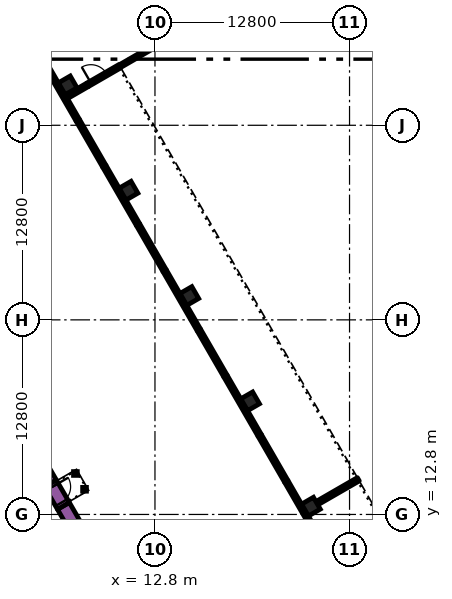
"""IFC4 building model, lengths in metres.
Left out: names, types, materials, properties, quantities, classifications, styles, units other than length and angle.
Written with IfcOpenShell. Run it as: python <this file> out.ifc"""

import sys

from ifc_helpers import new_model, si_unit, direction, frame, frame_2d, origin, origin_2d, place, context, subcontext, project, spatial, rectangle, extrude, element, fill, save


model = new_model("IFC4")
c1 = context("Model", 3, precision=1e-05, world=origin(), true_north=direction((0.0, 1.0)))
c2 = subcontext(c1, "Body", "Model", "MODEL_VIEW")
j1 = project(units=[si_unit("LENGTHUNIT", "METRE"), si_unit("PLANEANGLEUNIT", "RADIAN")], contexts=[c1])
p1 = place(None, origin())
s1 = spatial("IfcSite", under=j1, at=p1, CompositionType="ELEMENT")
p2 = place(p1, origin())
s2 = spatial("IfcBuilding", under=s1, at=p2, CompositionType="ELEMENT")
p3 = place(p2, origin())
s3 = spatial("IfcBuildingStorey", under=s2, at=p3, CompositionType="ELEMENT", Elevation=0.0)
p4 = place(p3, frame((19.355, 12.329, 2.1), z_axis=(-0.200269190983, 0.336813845705, 0.920026458578), x_axis=(-0.859534207637, -0.511078218966, 0.0)))
e1 = element("IfcColumn", 1, at=p4, inside=s3, PredefinedType="COLUMN", context=c2, shape_type="SweptSolid", body=[
    extrude(rectangle(XDim=1.8, YDim=1.6, at=origin_2d()), origin(), (0.0, 0.0, 1.0), 17.608),
])
p5 = place(p2, frame((0.0, 0.0, 11.4)))
s4 = spatial("IfcBuildingStorey", under=s2, at=p5, CompositionType="ELEMENT", Elevation=11.4)
for number, where, z_axis, x_axis in (
    (2, (23.061, 13.314, 0.0), (0.0, 0.0, 1.0), (-0.5, 0.866, 0.0)),
    (3, (19.061, 20.242, 0.0), (0.0, 0.0, 1.0), (-0.5, 0.866, 0.0)),
    (4, (15.061, 27.17, 0.0), (0.0, 0.0, 1.0), (-0.5, 0.866, 0.0)),
    (5, (11.061, 34.099, 0.0), (0.0, 0.0, 1.0), (-0.5, 0.866, 0.0)),
    (6, (7.061, 41.027, 0.0), (0.0, 0.0, 1.0), (-0.5, 0.866, 0.0)),
):
    element("IfcColumn", number, at=place(p5, frame(where, z_axis=z_axis, x_axis=x_axis)), inside=s4, PredefinedType="COLUMN", context=c2, shape_type="SweptSolid", body=[
        extrude(rectangle(XDim=0.9, YDim=0.9, at=origin_2d()), origin(), (0.0, 0.0, 1.0), 4.8),
    ])
p6 = place(p5, frame((6.776, 13.364, 0.0), z_axis=(0.0, 0.0, 1.0), x_axis=(0.500004177138, -0.8660229921, 0.0)))
e7 = element("IfcWall", 7, at=p6, inside=s4, PredefinedType="SOLIDWALL", context=c2, shape_type="SweptSolid", body=[
    extrude(rectangle(XDim=20.204, YDim=0.9, at=frame_2d((10.102, 0.0))), origin(), (0.0, 0.0, 1.0), 4.8),
])
p7 = place(p5, frame((5.926, 14.836, 0.0), z_axis=(0.0, 0.0, 1.0), x_axis=(-0.500076735116, 0.865981096212, 0.0)))
e8 = element("IfcWall", 8, at=p7, inside=s4, PredefinedType="SOLIDWALL", context=c2, shape_type="SweptSolid", body=[
    extrude(rectangle(XDim=1.094, YDim=0.9, at=frame_2d((0.547, 0.0))), origin(), (0.0, 0.0, 1.0), 4.8),
])
p8 = place(p5, frame((5.926, 14.836, 0.0), z_axis=(0.0, 0.0, 1.0), x_axis=(0.500062241894, -0.865989465428, 0.0)))
e9 = element("IfcWall", 9, at=p8, inside=s4, PredefinedType="SOLIDWALL", context=c2, shape_type="SweptSolid", body=[
    extrude(rectangle(XDim=1.7, YDim=0.9, at=frame_2d((0.85, 0.0))), origin(), (0.0, 0.0, 1.0), 4.8),
])
p9 = place(p8, frame((0.25, 0.0, 0.0)))
e10 = element("IfcOpeningElement", 10, at=p9, cuts=e9, PredefinedType="OPENING", context=c2, shape_type="SweptSolid", body=[
    extrude(rectangle(XDim=1.2, YDim=2.1, at=frame_2d((0.6, 1.05))), frame((0.0, 0.46, 0.0), z_axis=(0.0, -1.0, 0.0), x_axis=(1.0, 0.0, 0.0)), (0.0, 0.0, 1.0), 0.92),
])
p10 = place(p2, frame((0.0, 0.0, 6.0)))
s5 = spatial("IfcBuildingStorey", under=s2, at=p10, CompositionType="ELEMENT", Elevation=6.0)
p11 = place(p10, frame((26.178, 15.114, 0.0), z_axis=(0.0, 0.0, 1.0), x_axis=(0.866025540551, 0.499999763114, 0.0)))
e11 = element("IfcWall", 11, at=p11, inside=s5, PredefinedType="SOLIDWALL", context=c2, shape_type="SweptSolid", body=[
    extrude(rectangle(XDim=39.4, YDim=0.25, at=frame_2d((19.7, 0.0))), origin(), (0.0, 0.0, 1.0), 10.2),
])
p12 = place(p5, frame((23.688, 11.078, 0.0), z_axis=(0.0, 0.0, 1.0), x_axis=(-0.499990139034, 0.866031096941, 0.0)))
e12 = element("IfcWall", 12, at=p12, inside=s4, PredefinedType="SOLIDWALL", context=c2, shape_type="SweptSolid", body=[
    extrude(rectangle(XDim=4.5, YDim=0.25, at=frame_2d((2.25, 0.0))), origin(), (0.0, 0.0, 1.0), 4.5),
])
p13 = place(p5, frame((21.438, 14.975, 0.0), z_axis=(0.0, 0.0, 1.0), x_axis=(-0.500010275428, 0.866019471182, 0.0)))
e13 = element("IfcWall", 13, at=p13, inside=s4, PredefinedType="SOLIDWALL", context=c2, shape_type="SweptSolid", body=[
    extrude(rectangle(XDim=3.5, YDim=0.25, at=frame_2d((1.75, 0.0))), origin(), (0.0, 0.0, 1.0), 4.5),
])
p14 = place(p13, frame((0.25, 0.0, 0.9)))
e14 = element("IfcOpeningElement", 14, at=p14, cuts=e13, PredefinedType="OPENING", context=c2, shape_type="SweptSolid", body=[
    extrude(rectangle(XDim=3.0, YDim=2.2, at=frame_2d((1.5, 1.1))), frame((0.0, 0.135, 0.0), z_axis=(0.0, -1.0, 0.0), x_axis=(1.0, 0.0, 0.0)), (0.0, 0.0, 1.0), 0.27),
])
p15 = place(p5, frame((19.688, 18.006, 0.0), z_axis=(0.0, 0.0, 1.0), x_axis=(-0.499990139034, 0.866031096941, 0.0)))
e15 = element("IfcWall", 15, at=p15, inside=s4, PredefinedType="SOLIDWALL", context=c2, shape_type="SweptSolid", body=[
    extrude(rectangle(XDim=4.5, YDim=0.25, at=frame_2d((2.25, 0.0))), origin(), (0.0, 0.0, 1.0), 4.5),
])
p16 = place(p5, frame((17.438, 21.903, 0.0), z_axis=(0.0, 0.0, 1.0), x_axis=(-0.500010275428, 0.866019471182, 0.0)))
e16 = element("IfcWall", 16, at=p16, inside=s4, PredefinedType="SOLIDWALL", context=c2, shape_type="SweptSolid", body=[
    extrude(rectangle(XDim=3.5, YDim=0.25, at=frame_2d((1.75, 0.0))), origin(), (0.0, 0.0, 1.0), 4.5),
])
p17 = place(p16, frame((0.25, 0.0, 0.9)))
e17 = element("IfcOpeningElement", 17, at=p17, cuts=e16, PredefinedType="OPENING", context=c2, shape_type="SweptSolid", body=[
    extrude(rectangle(XDim=3.0, YDim=2.2, at=frame_2d((1.5, 1.1))), frame((0.0, 0.135, 0.0), z_axis=(0.0, -1.0, 0.0), x_axis=(1.0, 0.0, 0.0)), (0.0, 0.0, 1.0), 0.27),
])
p18 = place(p5, frame((15.688, 24.934, 0.0), z_axis=(0.0, 0.0, 1.0), x_axis=(-0.499990139034, 0.866031096941, 0.0)))
e18 = element("IfcWall", 18, at=p18, inside=s4, PredefinedType="SOLIDWALL", context=c2, shape_type="SweptSolid", body=[
    extrude(rectangle(XDim=4.5, YDim=0.25, at=frame_2d((2.25, 0.0))), origin(), (0.0, 0.0, 1.0), 4.5),
])
p19 = place(p5, frame((13.438, 28.832, 0.0), z_axis=(0.0, 0.0, 1.0), x_axis=(-0.500010275428, 0.866019471182, 0.0)))
e19 = element("IfcWall", 19, at=p19, inside=s4, PredefinedType="SOLIDWALL", context=c2, shape_type="SweptSolid", body=[
    extrude(rectangle(XDim=3.5, YDim=0.25, at=frame_2d((1.75, 0.0))), origin(), (0.0, 0.0, 1.0), 4.5),
])
p20 = place(p19, frame((0.25, 0.0, 0.9)))
e20 = element("IfcOpeningElement", 20, at=p20, cuts=e19, PredefinedType="OPENING", context=c2, shape_type="SweptSolid", body=[
    extrude(rectangle(XDim=3.0, YDim=2.2, at=frame_2d((1.5, 1.1))), frame((0.0, 0.135, 0.0), z_axis=(0.0, -1.0, 0.0), x_axis=(1.0, 0.0, 0.0)), (0.0, 0.0, 1.0), 0.27),
])
p21 = place(p5, frame((11.688, 31.863, 0.0), z_axis=(0.0, 0.0, 1.0), x_axis=(-0.499990705068, 0.866030770149, 0.0)))
e21 = element("IfcWall", 21, at=p21, inside=s4, PredefinedType="SOLIDWALL", context=c2, shape_type="SweptSolid", body=[
    extrude(rectangle(XDim=4.438, YDim=0.25, at=frame_2d((2.219, 0.0))), origin(), (0.0, 0.0, 1.0), 4.5),
])
p22 = place(p5, frame((9.469, 35.706, 0.0), z_axis=(0.0, 0.0, 1.0), x_axis=(-0.500010275428, 0.866019471182, 0.0)))
e22 = element("IfcWall", 22, at=p22, inside=s4, PredefinedType="SOLIDWALL", context=c2, shape_type="SweptSolid", body=[
    extrude(rectangle(XDim=3.5, YDim=0.25, at=frame_2d((1.75, 0.0))), origin(), (0.0, 0.0, 1.0), 4.5),
])
p23 = place(p22, frame((0.25, 0.0, 0.9)))
e23 = element("IfcOpeningElement", 23, at=p23, cuts=e22, PredefinedType="OPENING", context=c2, shape_type="SweptSolid", body=[
    extrude(rectangle(XDim=3.0, YDim=2.2, at=frame_2d((1.5, 1.1))), frame((0.0, 0.135, 0.0), z_axis=(0.0, -1.0, 0.0), x_axis=(1.0, 0.0, 0.0)), (0.0, 0.0, 1.0), 0.27),
])
p24 = place(p5, frame((7.719, 38.737, 0.0), z_axis=(0.0, 0.0, 1.0), x_axis=(-0.500001855621, 0.866024332438, 0.0)))
e24 = element("IfcWall", 24, at=p24, inside=s4, PredefinedType="SOLIDWALL", context=c2, shape_type="SweptSolid", body=[
    extrude(rectangle(XDim=10.312, YDim=0.25, at=frame_2d((5.156, 0.0))), origin(), (0.0, 0.0, 1.0), 4.5),
])
p25 = place(p5, frame((23.45, 13.539, 0.0), z_axis=(0.0, 0.0, 1.0), x_axis=(0.866035871367, 0.499981869177, 0.0)))
e25 = element("IfcWall", 25, at=p25, inside=s4, PredefinedType="SOLIDWALL", context=c2, shape_type="SweptSolid", body=[
    extrude(rectangle(XDim=3.15, YDim=0.25, at=frame_2d((1.575, 0.0))), origin(), (0.0, 0.0, 1.0), 3.9),
])
p26 = place(p5, frame((6.983, 40.26, 0.0), z_axis=(0.0, 0.0, 1.0), x_axis=(0.865989903783, 0.500061482766, 0.0)))
e26 = element("IfcWall", 26, at=p26, inside=s4, PredefinedType="SOLIDWALL", context=c2, shape_type="SweptSolid", body=[
    extrude(rectangle(XDim=1.6, YDim=0.25, at=frame_2d((0.8, 0.0))), origin(), (0.0, 0.0, 1.0), 3.9),
])
p27 = place(p5, frame((8.369, 41.061, 0.0), z_axis=(0.0, 0.0, 1.0), x_axis=(0.866014668023, 0.500018594424, 0.0)))
e27 = element("IfcWall", 27, at=p27, inside=s4, PredefinedType="SOLIDWALL", context=c2, shape_type="SweptSolid", body=[
    extrude(rectangle(XDim=2.45, YDim=0.25, at=frame_2d((1.225, 0.0))), origin(), (0.0, 0.0, 1.0), 3.9),
])
p28 = place(p27, frame((0.25, 0.0, 0.0)))
e28 = element("IfcOpeningElement", 28, at=p28, cuts=e27, PredefinedType="OPENING", context=c2, shape_type="SweptSolid", body=[
    extrude(rectangle(XDim=1.2, YDim=2.1, at=frame_2d((0.6, 1.05))), frame((0.0, 0.135, 0.0), z_axis=(0.0, -1.0, 0.0), x_axis=(1.0, 0.0, 0.0)), (0.0, 0.0, 1.0), 0.27),
])
p29 = place(p5, frame((10.491, 42.286, 0.0), z_axis=(0.0, 0.0, 1.0), x_axis=(0.866025540551, 0.499999763114, 0.0)))
e29 = element("IfcWall", 29, at=p29, inside=s4, PredefinedType="PARTITIONING", context=c2, shape_type="SweptSolid", body=[
    extrude(rectangle(XDim=39.4, YDim=0.2, at=frame_2d((19.7, 0.0))), origin(), (0.0, 0.0, 1.0), 3.9),
])
for number, where, z_axis, x_axis in (
    (30, (8.167, 14.455, 0.0), (0.0, 0.0, 1.0), (1.0, 0.0, 0.0)),
    (31, (7.566, 15.495, 0.0), (0.0, 0.0, 1.0), (1.0, 0.0, 0.0)),
):
    element("IfcColumn", number, at=place(p5, frame(where, z_axis=z_axis, x_axis=x_axis)), inside=s4, PredefinedType="COLUMN", context=c2, shape_type="SweptSolid", body=[
        extrude(rectangle(XDim=0.25, YDim=0.25, at=origin_2d()), origin(), (0.0, 0.0, 1.0), 4.6),
    ])
p30 = place(p9, origin())
e32 = element("IfcDoor", 32, at=p30, inside=s4, OperationType="SINGLE_SWING_LEFT", PredefinedType="DOOR", context=c2, shape_type="SweptSolid", body=[
    extrude(rectangle(XDim=1.2, YDim=2.1, at=frame_2d((0.6, 1.05))), frame((0.0, 0.025, 0.0), z_axis=(0.0, -1.0, 0.0), x_axis=(1.0, 0.0, 0.0)), (0.0, 0.0, 1.0), 0.05),
])
fill(e10, e32)
p31 = place(p14, origin())
e33 = element("IfcWindow", 33, at=p31, inside=s4, PartitioningType="SINGLE_PANEL", PredefinedType="WINDOW", context=c2, shape_type="SweptSolid", body=[
    extrude(rectangle(XDim=3.0, YDim=2.2, at=frame_2d((1.5, 1.1))), frame((0.0, 0.03, 0.0), z_axis=(0.0, -1.0, 0.0), x_axis=(1.0, 0.0, 0.0)), (0.0, 0.0, 1.0), 0.06),
])
fill(e14, e33)
p32 = place(p17, origin())
e34 = element("IfcWindow", 34, at=p32, inside=s4, PartitioningType="SINGLE_PANEL", PredefinedType="WINDOW", context=c2, shape_type="SweptSolid", body=[
    extrude(rectangle(XDim=3.0, YDim=2.2, at=frame_2d((1.5, 1.1))), frame((0.0, 0.03, 0.0), z_axis=(0.0, -1.0, 0.0), x_axis=(1.0, 0.0, 0.0)), (0.0, 0.0, 1.0), 0.06),
])
fill(e17, e34)
p33 = place(p20, origin())
e35 = element("IfcWindow", 35, at=p33, inside=s4, PartitioningType="SINGLE_PANEL", PredefinedType="WINDOW", context=c2, shape_type="SweptSolid", body=[
    extrude(rectangle(XDim=3.0, YDim=2.2, at=frame_2d((1.5, 1.1))), frame((0.0, 0.03, 0.0), z_axis=(0.0, -1.0, 0.0), x_axis=(1.0, 0.0, 0.0)), (0.0, 0.0, 1.0), 0.06),
])
fill(e20, e35)
p34 = place(p23, origin())
e36 = element("IfcWindow", 36, at=p34, inside=s4, PartitioningType="SINGLE_PANEL", PredefinedType="WINDOW", context=c2, shape_type="SweptSolid", body=[
    extrude(rectangle(XDim=3.0, YDim=2.2, at=frame_2d((1.5, 1.1))), frame((0.0, 0.03, 0.0), z_axis=(0.0, -1.0, 0.0), x_axis=(1.0, 0.0, 0.0)), (0.0, 0.0, 1.0), 0.06),
])
fill(e23, e36)
p35 = place(p28, origin())
e37 = element("IfcDoor", 37, at=p35, inside=s4, OperationType="SINGLE_SWING_LEFT", PredefinedType="DOOR", context=c2, shape_type="SweptSolid", body=[
    extrude(rectangle(XDim=1.2, YDim=2.1, at=frame_2d((0.6, 1.05))), frame((0.0, 0.025, 0.0), z_axis=(0.0, -1.0, 0.0), x_axis=(1.0, 0.0, 0.0)), (0.0, 0.0, 1.0), 0.05),
])
fill(e28, e37)
save(model, sys.argv[1])
